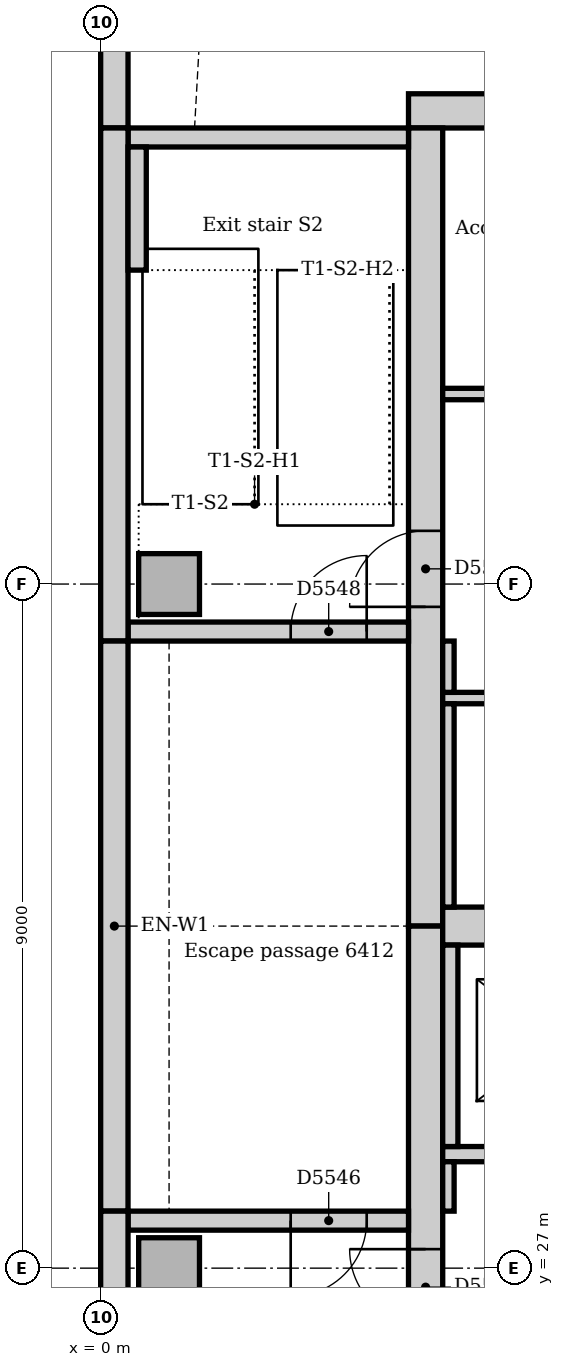
"""IFC4 building model, lengths in metres.
Left out: names, types, materials, properties, quantities, classifications, styles, units other than length and angle.
Written with IfcOpenShell. Run it as: python <this file> out.ifc"""

import sys

from ifc_helpers import new_model, si_unit, direction, frame, frame_2d, origin, origin_2d, place, context, subcontext, project, spatial, rectangle, extrude, element, fill, save


model = new_model("IFC4")
c1 = context("Model", 3, precision=1e-05, world=origin(), true_north=direction((0.0, 1.0)))
c2 = subcontext(c1, "Body", "Model", "MODEL_VIEW")
j1 = project(units=[si_unit("LENGTHUNIT", "METRE"), si_unit("PLANEANGLEUNIT", "RADIAN")], contexts=[c1])
p1 = place(None, origin())
s1 = spatial("IfcSite", under=j1, at=p1, CompositionType="ELEMENT")
p2 = place(p1, origin())
s2 = spatial("IfcBuilding", under=s1, at=p2, CompositionType="ELEMENT")
p3 = place(p2, frame((0.0, 0.0, 267.0)))
s3 = spatial("IfcBuildingStorey", under=s2, at=p3, CompositionType="ELEMENT", Elevation=267.0)
p4 = place(p3, frame((22.95, 42.225, 0.0), z_axis=(0.0, 0.0, 1.0), x_axis=(-1.0, 0.0, 0.0)))
e1 = element("IfcWall", 1, at=p4, inside=s3, PredefinedType="SOLIDWALL", context=c2, shape_type="SweptSolid", body=[
    extrude(rectangle(XDim=18.9, YDim=0.45, at=frame_2d((9.45, 0.0))), origin(), (0.0, 0.0, 1.0), 4.0),
])
p5 = place(p3, frame((4.275, 42.0, 0.0), z_axis=(0.0, 0.0, 1.0), x_axis=(0.0, -1.0, 0.0)))
e2 = element("IfcWall", 2, at=p5, inside=s3, PredefinedType="SOLIDWALL", context=c2, shape_type="SweptSolid", body=[
    extrude(rectangle(XDim=10.5, YDim=0.45, at=frame_2d((5.25, 0.0))), origin(), (0.0, 0.0, 1.0), 4.0),
])
p6 = place(p5, frame((5.3, 0.0, 0.0)))
e3 = element("IfcOpeningElement", 3, at=p6, cuts=e2, PredefinedType="OPENING", context=c2, shape_type="SweptSolid", body=[
    extrude(rectangle(XDim=1.0, YDim=2.1, at=frame_2d((0.5, 1.05))), frame((0.0, 0.235, 0.0), z_axis=(0.0, -1.0, 0.0), x_axis=(1.0, 0.0, 0.0)), (0.0, 0.0, 1.0), 0.47),
])
p7 = place(p3, frame((4.275, 31.5, 0.0), z_axis=(0.0, 0.0, 1.0), x_axis=(0.0, -1.0, 0.0)))
e4 = element("IfcWall", 4, at=p7, inside=s3, PredefinedType="SOLIDWALL", context=c2, shape_type="SweptSolid", body=[
    extrude(rectangle(XDim=10.5, YDim=0.45, at=frame_2d((5.25, 0.0))), origin(), (0.0, 0.0, 1.0), 4.0),
])
p8 = place(p7, frame((4.25, 0.0, 0.0)))
e5 = element("IfcOpeningElement", 5, at=p8, cuts=e4, PredefinedType="OPENING", context=c2, shape_type="SweptSolid", body=[
    extrude(rectangle(XDim=1.0, YDim=2.1, at=frame_2d((0.5, 1.05))), frame((0.0, 0.235, 0.0), z_axis=(0.0, -1.0, 0.0), x_axis=(1.0, 0.0, 0.0)), (0.0, 0.0, 1.0), 0.47),
])
p9 = place(p3, frame((4.5, 31.5, 0.0), z_axis=(0.0, 0.0, 1.0), x_axis=(1.0, 0.0, 0.0)))
e6 = element("IfcWall", 6, at=p9, inside=s3, PredefinedType="SOLIDWALL", context=c2, shape_type="SweptSolid", body=[
    extrude(rectangle(XDim=18.0, YDim=0.5, at=frame_2d((9.0, 0.0))), origin(), (0.0, 0.0, 1.0), 4.0),
])
p10 = place(p3, frame((4.05, 27.625, 0.0), z_axis=(0.0, 0.0, 1.0), x_axis=(-1.0, 0.0, 0.0)))
e7 = element("IfcWall", 7, at=p10, inside=s3, PredefinedType="SOLIDWALL", context=c2, shape_type="SweptSolid", body=[
    extrude(rectangle(XDim=3.69, YDim=0.25, at=frame_2d((1.845, 0.0))), origin(), (0.0, 0.0, 1.0), 4.0),
])
p11 = place(p10, frame((0.55, 0.0, 0.0)))
e8 = element("IfcOpeningElement", 8, at=p11, cuts=e7, PredefinedType="OPENING", context=c2, shape_type="SweptSolid", body=[
    extrude(rectangle(XDim=1.0, YDim=2.1, at=frame_2d((0.5, 1.05))), frame((0.0, 0.135, 0.0), z_axis=(0.0, -1.0, 0.0), x_axis=(1.0, 0.0, 0.0)), (0.0, 0.0, 1.0), 0.27),
])
p12 = place(p3, frame((0.36, 35.375, 0.0), z_axis=(0.0, 0.0, 1.0), x_axis=(1.0, 0.0, 0.0)))
e9 = element("IfcWall", 9, at=p12, inside=s3, PredefinedType="SOLIDWALL", context=c2, shape_type="SweptSolid", body=[
    extrude(rectangle(XDim=3.69, YDim=0.25, at=frame_2d((1.845, 0.0))), origin(), (0.0, 0.0, 1.0), 4.0),
])
p13 = place(p12, frame((2.14, 0.0, 0.0)))
e10 = element("IfcOpeningElement", 10, at=p13, cuts=e9, PredefinedType="OPENING", context=c2, shape_type="SweptSolid", body=[
    extrude(rectangle(XDim=1.0, YDim=2.1, at=frame_2d((0.5, 1.05))), frame((0.0, 0.135, 0.0), z_axis=(0.0, -1.0, 0.0), x_axis=(1.0, 0.0, 0.0)), (0.0, 0.0, 1.0), 0.27),
])
p14 = place(p3, frame((4.05, 41.875, 0.0), z_axis=(0.0, 0.0, 1.0), x_axis=(-1.0, 0.0, 0.0)))
e11 = element("IfcWall", 11, at=p14, inside=s3, PredefinedType="SOLIDWALL", context=c2, shape_type="SweptSolid", body=[
    extrude(rectangle(XDim=3.69, YDim=0.25, at=frame_2d((1.845, 0.0))), origin(), (0.0, 0.0, 1.0), 4.0),
])
for number, where, z_axis, x_axis in (
    (12, (0.9, 27.0, 0.0), (0.0, 0.0, 1.0), (1.0, 0.0, 0.0)),
    (13, (0.9, 36.0, 0.0), (0.0, 0.0, 1.0), (1.0, 0.0, 0.0)),
):
    element("IfcColumn", number, at=place(p3, frame(where, z_axis=z_axis, x_axis=x_axis)), inside=s3, PredefinedType="COLUMN", context=c2, shape_type="SweptSolid", body=[
        extrude(rectangle(XDim=0.8, YDim=0.8, at=origin_2d()), origin(), (0.0, 0.0, 1.0), 4.0),
    ])
p15 = place(p3, frame((0.18, 58.757, 0.0), z_axis=(0.0, 0.0, 1.0), x_axis=(0.0, -1.0, 0.0)))
e14 = element("IfcWall", 14, at=p15, inside=s3, PredefinedType="STANDARD", context=c2, shape_type="SweptSolid", body=[
    extrude(rectangle(XDim=16.757, YDim=0.36, at=frame_2d((8.379, 0.0))), origin(), (0.0, 0.0, 1.0), 3.85),
])
p16 = place(p15, frame((3.107, 0.0, 0.9)))
e15 = element("IfcOpeningElement", 15, at=p16, cuts=e14, PredefinedType="OPENING", context=c2, shape_type="SweptSolid", body=[
    extrude(rectangle(XDim=3.3, YDim=1.6, at=frame_2d((1.65, 0.8))), frame((0.0, 0.19, 0.0), z_axis=(0.0, -1.0, 0.0), x_axis=(1.0, 0.0, 0.0)), (0.0, 0.0, 1.0), 0.38),
])
p17 = place(p15, frame((7.607, 0.0, 0.9)))
e16 = element("IfcOpeningElement", 16, at=p17, cuts=e14, PredefinedType="OPENING", context=c2, shape_type="SweptSolid", body=[
    extrude(rectangle(XDim=3.3, YDim=1.6, at=frame_2d((1.65, 0.8))), frame((0.0, 0.19, 0.0), z_axis=(0.0, -1.0, 0.0), x_axis=(1.0, 0.0, 0.0)), (0.0, 0.0, 1.0), 0.38),
])
p18 = place(p15, frame((12.107, 0.0, 0.9)))
e17 = element("IfcOpeningElement", 17, at=p18, cuts=e14, PredefinedType="OPENING", context=c2, shape_type="SweptSolid", body=[
    extrude(rectangle(XDim=3.3, YDim=1.6, at=frame_2d((1.65, 0.8))), frame((0.0, 0.19, 0.0), z_axis=(0.0, -1.0, 0.0), x_axis=(1.0, 0.0, 0.0)), (0.0, 0.0, 1.0), 0.38),
])
p19 = place(p3, frame((0.18, 42.0, 0.0), z_axis=(0.0, 0.0, 1.0), x_axis=(0.0, -1.0, 0.0)))
e18 = element("IfcWall", 18, at=p19, inside=s3, PredefinedType="STANDARD", context=c2, shape_type="SweptSolid", body=[
    extrude(rectangle(XDim=6.75, YDim=0.36, at=frame_2d((3.375, 0.0))), origin(), (0.0, 0.0, 1.0), 3.85),
])
p20 = place(p3, frame((0.18, 35.25, 0.0), z_axis=(0.0, 0.0, 1.0), x_axis=(0.0, -1.0, 0.0)))
e19 = element("IfcWall", 19, at=p20, inside=s3, PredefinedType="STANDARD", context=c2, shape_type="SweptSolid", body=[
    extrude(rectangle(XDim=7.5, YDim=0.36, at=frame_2d((3.75, 0.0))), origin(), (0.0, 0.0, 1.0), 3.85),
])
p21 = place(p3, frame((0.18, 27.75, 0.0), z_axis=(0.0, 0.0, 1.0), x_axis=(0.0, -1.0, 0.0)))
e20 = element("IfcWall", 20, at=p21, inside=s3, PredefinedType="STANDARD", context=c2, shape_type="SweptSolid", body=[
    extrude(rectangle(XDim=5.507, YDim=0.36, at=frame_2d((2.754, 0.0))), origin(), (0.0, 0.0, 1.0), 3.85),
])
p22 = place(p3, frame((0.48, 40.13, 0.0), z_axis=(0.0, 0.0, 1.0), x_axis=(0.0, 1.0, 0.0)))
e21 = element("IfcWall", 21, at=p22, inside=s3, PredefinedType="STANDARD", context=c2, shape_type="SweptSolid", body=[
    extrude(rectangle(XDim=1.62, YDim=0.24, at=frame_2d((0.81, 0.0))), origin(), (0.0, 0.0, 1.0), 4.0),
])
p23 = place(p3, frame((4.5, 28.5, 0.0), z_axis=(0.0, 0.0, 1.0), x_axis=(1.0, 0.0, 0.0)))
e22 = element("IfcWall", 22, at=p23, inside=s3, PredefinedType="PARTITIONING", context=c2, shape_type="SweptSolid", body=[
    extrude(rectangle(XDim=18.0, YDim=0.2, at=frame_2d((9.0, 0.0))), origin(), (0.0, 0.0, 1.0), 3.85),
])
p24 = place(p23, frame((0.95, 0.0, 0.0)))
e23 = element("IfcOpeningElement", 23, at=p24, cuts=e22, PredefinedType="OPENING", context=c2, shape_type="SweptSolid", body=[
    extrude(rectangle(XDim=1.1, YDim=2.1, at=frame_2d((0.55, 1.05))), frame((0.0, 0.11, 0.0), z_axis=(0.0, -1.0, 0.0), x_axis=(1.0, 0.0, 0.0)), (0.0, 0.0, 1.0), 0.22),
])
p25 = place(p23, frame((3.95, 0.0, 0.0)))
e24 = element("IfcOpeningElement", 24, at=p25, cuts=e22, PredefinedType="OPENING", context=c2, shape_type="SweptSolid", body=[
    extrude(rectangle(XDim=1.1, YDim=2.1, at=frame_2d((0.55, 1.05))), frame((0.0, 0.11, 0.0), z_axis=(0.0, -1.0, 0.0), x_axis=(1.0, 0.0, 0.0)), (0.0, 0.0, 1.0), 0.22),
])
p26 = place(p23, frame((6.95, 0.0, 0.0)))
e25 = element("IfcOpeningElement", 25, at=p26, cuts=e22, PredefinedType="OPENING", context=c2, shape_type="SweptSolid", body=[
    extrude(rectangle(XDim=1.1, YDim=2.1, at=frame_2d((0.55, 1.05))), frame((0.0, 0.11, 0.0), z_axis=(0.0, -1.0, 0.0), x_axis=(1.0, 0.0, 0.0)), (0.0, 0.0, 1.0), 0.22),
])
p27 = place(p23, frame((9.95, 0.0, 0.0)))
e26 = element("IfcOpeningElement", 26, at=p27, cuts=e22, PredefinedType="OPENING", context=c2, shape_type="SweptSolid", body=[
    extrude(rectangle(XDim=1.1, YDim=2.1, at=frame_2d((0.55, 1.05))), frame((0.0, 0.11, 0.0), z_axis=(0.0, -1.0, 0.0), x_axis=(1.0, 0.0, 0.0)), (0.0, 0.0, 1.0), 0.22),
])
p28 = place(p23, frame((12.95, 0.0, 0.0)))
e27 = element("IfcOpeningElement", 27, at=p28, cuts=e22, PredefinedType="OPENING", context=c2, shape_type="SweptSolid", body=[
    extrude(rectangle(XDim=1.1, YDim=2.1, at=frame_2d((0.55, 1.05))), frame((0.0, 0.11, 0.0), z_axis=(0.0, -1.0, 0.0), x_axis=(1.0, 0.0, 0.0)), (0.0, 0.0, 1.0), 0.22),
])
p29 = place(p23, frame((15.95, 0.0, 0.0)))
e28 = element("IfcOpeningElement", 28, at=p29, cuts=e22, PredefinedType="OPENING", context=c2, shape_type="SweptSolid", body=[
    extrude(rectangle(XDim=1.1, YDim=2.1, at=frame_2d((0.55, 1.05))), frame((0.0, 0.11, 0.0), z_axis=(0.0, -1.0, 0.0), x_axis=(1.0, 0.0, 0.0)), (0.0, 0.0, 1.0), 0.22),
])
p30 = place(p3, frame((4.6, 28.6, 0.0), z_axis=(0.0, 0.0, 1.0), x_axis=(0.0, 1.0, 0.0)))
e29 = element("IfcWall", 29, at=p30, inside=s3, PredefinedType="PARTITIONING", context=c2, shape_type="SweptSolid", body=[
    extrude(rectangle(XDim=2.65, YDim=0.2, at=frame_2d((1.325, 0.0))), origin(), (0.0, 0.0, 1.0), 3.85),
])
p31 = place(p3, frame((4.5, 38.5, 0.0), z_axis=(0.0, 0.0, 1.0), x_axis=(1.0, 0.0, 0.0)))
e30 = element("IfcWall", 30, at=p31, inside=s3, PredefinedType="PARTITIONING", context=c2, shape_type="SweptSolid", body=[
    extrude(rectangle(XDim=11.9, YDim=0.15, at=frame_2d((5.95, 0.0))), origin(), (0.0, 0.0, 1.0), 3.85),
])
p32 = place(p31, frame((1.1, 0.0, 0.0)))
e31 = element("IfcOpeningElement", 31, at=p32, cuts=e30, PredefinedType="OPENING", context=c2, shape_type="SweptSolid", body=[
    extrude(rectangle(XDim=0.9, YDim=2.1, at=frame_2d((0.45, 1.05))), frame((0.0, 0.085, 0.0), z_axis=(0.0, -1.0, 0.0), x_axis=(1.0, 0.0, 0.0)), (0.0, 0.0, 1.0), 0.17),
])
p33 = place(p31, frame((4.8, 0.0, 0.0)))
e32 = element("IfcOpeningElement", 32, at=p33, cuts=e30, PredefinedType="OPENING", context=c2, shape_type="SweptSolid", body=[
    extrude(rectangle(XDim=0.9, YDim=2.1, at=frame_2d((0.45, 1.05))), frame((0.0, 0.085, 0.0), z_axis=(0.0, -1.0, 0.0), x_axis=(1.0, 0.0, 0.0)), (0.0, 0.0, 1.0), 0.17),
])
p34 = place(p31, frame((7.8, 0.0, 0.0)))
e33 = element("IfcOpeningElement", 33, at=p34, cuts=e30, PredefinedType="OPENING", context=c2, shape_type="SweptSolid", body=[
    extrude(rectangle(XDim=0.9, YDim=2.1, at=frame_2d((0.45, 1.05))), frame((0.0, 0.085, 0.0), z_axis=(0.0, -1.0, 0.0), x_axis=(1.0, 0.0, 0.0)), (0.0, 0.0, 1.0), 0.17),
])
p35 = place(p31, frame((9.95, 0.0, 0.0)))
e34 = element("IfcOpeningElement", 34, at=p35, cuts=e30, PredefinedType="OPENING", context=c2, shape_type="SweptSolid", body=[
    extrude(rectangle(XDim=0.8, YDim=2.1, at=frame_2d((0.4, 1.05))), frame((0.0, 0.085, 0.0), z_axis=(0.0, -1.0, 0.0), x_axis=(1.0, 0.0, 0.0)), (0.0, 0.0, 1.0), 0.17),
])
p36 = place(p3, frame((4.5, 34.5, 0.0), z_axis=(0.0, 0.0, 1.0), x_axis=(1.0, 0.0, 0.0)))
e35 = element("IfcWall", 35, at=p36, inside=s3, PredefinedType="PARTITIONING", context=c2, shape_type="SweptSolid", body=[
    extrude(rectangle(XDim=5.9, YDim=0.15, at=frame_2d((2.95, 0.0))), origin(), (0.0, 0.0, 1.0), 3.85),
])
p37 = place(p36, frame((2.5, 0.0, 0.0)))
e36 = element("IfcOpeningElement", 36, at=p37, cuts=e35, PredefinedType="OPENING", context=c2, shape_type="SweptSolid", body=[
    extrude(rectangle(XDim=0.9, YDim=2.1, at=frame_2d((0.45, 1.05))), frame((0.0, 0.085, 0.0), z_axis=(0.0, -1.0, 0.0), x_axis=(1.0, 0.0, 0.0)), (0.0, 0.0, 1.0), 0.17),
])
p38 = place(p3, frame((4.575, 34.575, 0.0), z_axis=(0.0, 0.0, 1.0), x_axis=(0.0, 1.0, 0.0)))
e37 = element("IfcWall", 37, at=p38, inside=s3, PredefinedType="PARTITIONING", context=c2, shape_type="SweptSolid", body=[
    extrude(rectangle(XDim=0.675, YDim=0.15, at=frame_2d((0.338, 0.0))), origin(), (0.0, 0.0, 1.0), 3.85),
])
p39 = place(p3, frame((4.575, 31.75, 0.0), z_axis=(0.0, 0.0, 1.0), x_axis=(0.0, 1.0, 0.0)))
e38 = element("IfcWall", 38, at=p39, inside=s3, PredefinedType="PARTITIONING", context=c2, shape_type="SweptSolid", body=[
    extrude(rectangle(XDim=2.675, YDim=0.15, at=frame_2d((1.337, 0.0))), origin(), (0.0, 0.0, 1.0), 3.85),
])
p40 = place(p3, frame((4.575, 27.75, 0.0), z_axis=(0.0, 0.0, 1.0), x_axis=(0.0, 1.0, 0.0)))
e39 = element("IfcWall", 39, at=p40, inside=s3, PredefinedType="PARTITIONING", context=c2, shape_type="SweptSolid", body=[
    extrude(rectangle(XDim=0.65, YDim=0.15, at=frame_2d((0.325, 0.0))), origin(), (0.0, 0.0, 1.0), 3.85),
])
p41 = place(p8, frame((1.0, 0.0, 0.0), z_axis=(0.0, 0.0, 1.0), x_axis=(-1.0, 0.0, 0.0)))
e40 = element("IfcDoor", 40, at=p41, inside=s3, OperationType="SINGLE_SWING_RIGHT", PredefinedType="DOOR", context=c2, shape_type="SweptSolid", body=[
    extrude(rectangle(XDim=1.0, YDim=2.1, at=frame_2d((0.5, 1.05))), frame((0.0, 0.025, 0.0), z_axis=(0.0, -1.0, 0.0), x_axis=(1.0, 0.0, 0.0)), (0.0, 0.0, 1.0), 0.05),
])
fill(e5, e40)
p42 = place(p11, origin())
e41 = element("IfcDoor", 41, at=p42, inside=s3, OperationType="SINGLE_SWING_RIGHT", PredefinedType="DOOR", context=c2, shape_type="SweptSolid", body=[
    extrude(rectangle(XDim=1.0, YDim=2.1, at=frame_2d((0.5, 1.05))), frame((0.0, 0.025, 0.0), z_axis=(0.0, -1.0, 0.0), x_axis=(1.0, 0.0, 0.0)), (0.0, 0.0, 1.0), 0.05),
])
fill(e8, e41)
p43 = place(p6, frame((1.0, 0.0, 0.0), z_axis=(0.0, 0.0, 1.0), x_axis=(-1.0, 0.0, 0.0)))
e42 = element("IfcDoor", 42, at=p43, inside=s3, OperationType="SINGLE_SWING_LEFT", PredefinedType="DOOR", context=c2, shape_type="SweptSolid", body=[
    extrude(rectangle(XDim=1.0, YDim=2.1, at=frame_2d((0.5, 1.05))), frame((0.0, 0.025, 0.0), z_axis=(0.0, -1.0, 0.0), x_axis=(1.0, 0.0, 0.0)), (0.0, 0.0, 1.0), 0.05),
])
fill(e3, e42)
p44 = place(p13, origin())
e43 = element("IfcDoor", 43, at=p44, inside=s3, OperationType="SINGLE_SWING_RIGHT", PredefinedType="DOOR", context=c2, shape_type="SweptSolid", body=[
    extrude(rectangle(XDim=1.0, YDim=2.1, at=frame_2d((0.5, 1.05))), frame((0.0, 0.025, 0.0), z_axis=(0.0, -1.0, 0.0), x_axis=(1.0, 0.0, 0.0)), (0.0, 0.0, 1.0), 0.05),
])
fill(e10, e43)
save(model, sys.argv[1])
